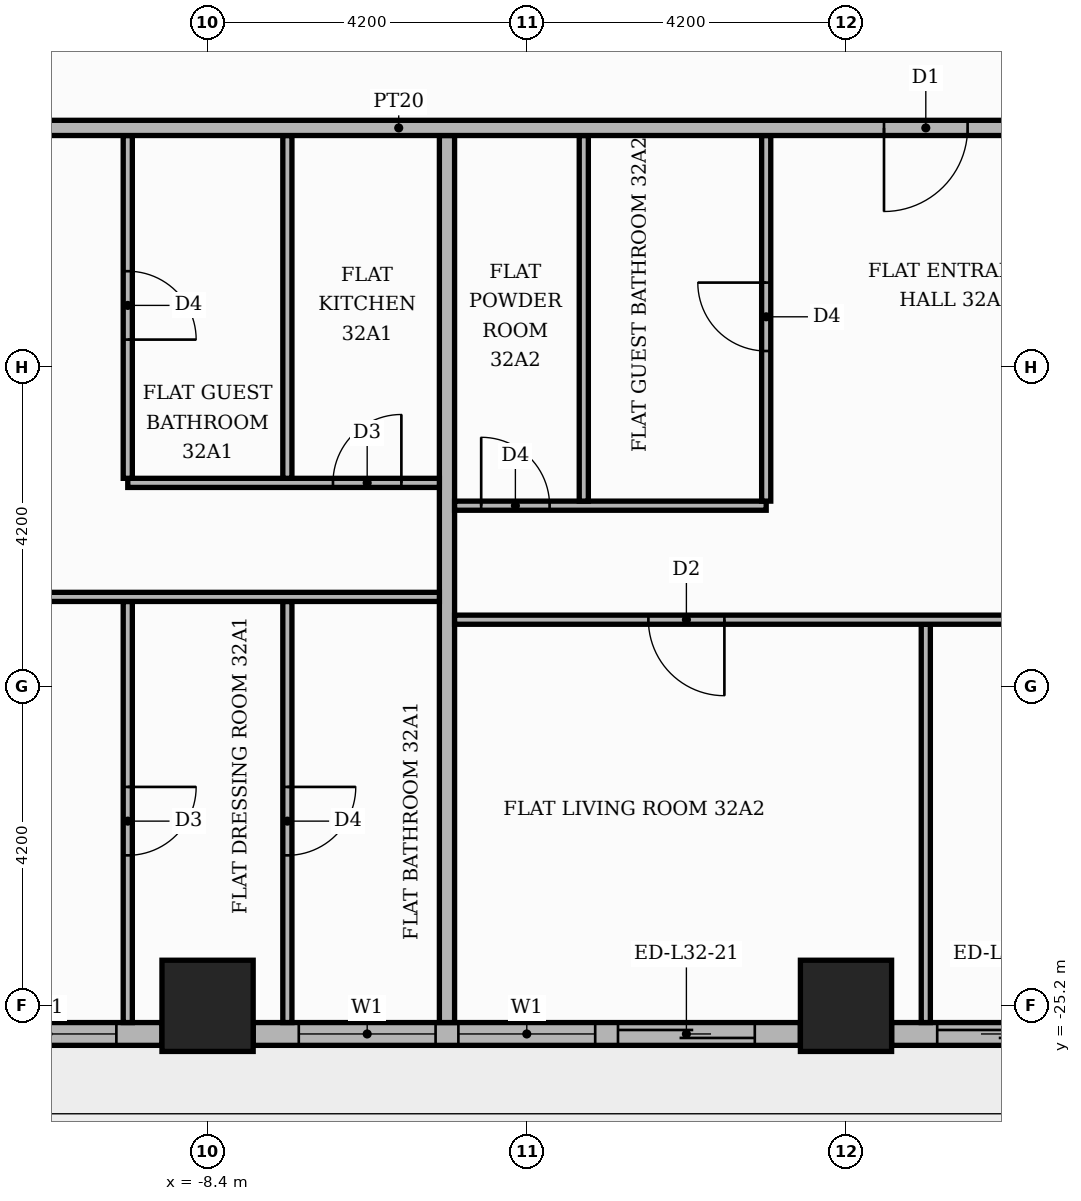
"""IFC4 building model, lengths in metres.
Left out: names, types, materials, properties, quantities, classifications, styles, units other than length and angle.
Written with IfcOpenShell. Run it as: python <this file> out.ifc"""

import sys

from ifc_helpers import new_model, si_unit, direction, frame, frame_2d, origin, origin_2d, place, context, subcontext, project, spatial, rectangle, extrude, element, fill, save


model = new_model("IFC4")
c1 = context("Model", 3, precision=1e-05, world=origin(), true_north=direction((0.0, 1.0)))
c2 = subcontext(c1, "Body", "Model", "MODEL_VIEW")
j1 = project(units=[si_unit("LENGTHUNIT", "METRE"), si_unit("PLANEANGLEUNIT", "RADIAN")], contexts=[c1])
p1 = place(None, origin())
s1 = spatial("IfcSite", under=j1, at=p1, CompositionType="ELEMENT")
p2 = place(p1, origin())
s2 = spatial("IfcBuilding", under=s1, at=p2, CompositionType="ELEMENT")
p3 = place(p2, frame((0.0, 0.0, 137.7)))
s3 = spatial("IfcBuildingStorey", under=s2, at=p3, CompositionType="ELEMENT", Elevation=137.7)
for number, where, z_axis, x_axis in (
    (1, (0.0, -25.2, 0.0), (0.0, 0.0, 1.0), (1.0, 0.0, 0.0)),
    (2, (-8.4, -25.2, 0.0), (0.0, 0.0, 1.0), (1.0, 0.0, 0.0)),
):
    element("IfcColumn", number, at=place(p3, frame(where, z_axis=z_axis, x_axis=x_axis)), inside=s3, PredefinedType="COLUMN", context=c2, shape_type="SweptSolid", body=[
        extrude(rectangle(XDim=1.2, YDim=1.2, at=origin_2d()), origin(), (0.0, 0.0, 1.0), 3.9),
    ])
p4 = place(p3, frame((-16.2, -25.57, 0.0), z_axis=(0.0, 0.0, 1.0), x_axis=(1.0, 0.0, 0.0)))
e3 = element("IfcWall", 3, at=p4, inside=s3, PredefinedType="STANDARD", context=c2, shape_type="SweptSolid", body=[
    extrude(rectangle(XDim=7.2, YDim=0.3, at=frame_2d((3.6, 0.0))), origin(), (0.0, 0.0, 1.0), 3.48),
])
p5 = place(p4, frame((0.6, 0.0, 0.0)))
e4 = element("IfcOpeningElement", 4, at=p5, cuts=e3, PredefinedType="OPENING", context=c2, shape_type="SweptSolid", body=[
    extrude(rectangle(XDim=1.8, YDim=2.4, at=frame_2d((0.9, 1.2))), frame((0.0, 0.16, 0.0), z_axis=(0.0, -1.0, 0.0), x_axis=(1.0, 0.0, 0.0)), (0.0, 0.0, 1.0), 0.32),
])
p6 = place(p4, frame((2.7, 0.0, 0.0)))
e5 = element("IfcOpeningElement", 5, at=p6, cuts=e3, PredefinedType="OPENING", context=c2, shape_type="SweptSolid", body=[
    extrude(rectangle(XDim=1.8, YDim=2.4, at=frame_2d((0.9, 1.2))), frame((0.0, 0.16, 0.0), z_axis=(0.0, -1.0, 0.0), x_axis=(1.0, 0.0, 0.0)), (0.0, 0.0, 1.0), 0.32),
])
p7 = place(p4, frame((4.8, 0.0, 0.9)))
e6 = element("IfcOpeningElement", 6, at=p7, cuts=e3, PredefinedType="OPENING", context=c2, shape_type="SweptSolid", body=[
    extrude(rectangle(XDim=1.8, YDim=2.1, at=frame_2d((0.9, 1.05))), frame((0.0, 0.16, 0.0), z_axis=(0.0, -1.0, 0.0), x_axis=(1.0, 0.0, 0.0)), (0.0, 0.0, 1.0), 0.32),
])
p8 = place(p3, frame((-7.8, -25.57, 0.0), z_axis=(0.0, 0.0, 1.0), x_axis=(1.0, 0.0, 0.0)))
e7 = element("IfcWall", 7, at=p8, inside=s3, PredefinedType="STANDARD", context=c2, shape_type="SweptSolid", body=[
    extrude(rectangle(XDim=7.2, YDim=0.3, at=frame_2d((3.6, 0.0))), origin(), (0.0, 0.0, 1.0), 3.48),
])
p9 = place(p8, frame((0.6, 0.0, 0.9)))
e8 = element("IfcOpeningElement", 8, at=p9, cuts=e7, PredefinedType="OPENING", context=c2, shape_type="SweptSolid", body=[
    extrude(rectangle(XDim=1.8, YDim=2.1, at=frame_2d((0.9, 1.05))), frame((0.0, 0.16, 0.0), z_axis=(0.0, -1.0, 0.0), x_axis=(1.0, 0.0, 0.0)), (0.0, 0.0, 1.0), 0.32),
])
p10 = place(p8, frame((2.7, 0.0, 0.9)))
e9 = element("IfcOpeningElement", 9, at=p10, cuts=e7, PredefinedType="OPENING", context=c2, shape_type="SweptSolid", body=[
    extrude(rectangle(XDim=1.8, YDim=2.1, at=frame_2d((0.9, 1.05))), frame((0.0, 0.16, 0.0), z_axis=(0.0, -1.0, 0.0), x_axis=(1.0, 0.0, 0.0)), (0.0, 0.0, 1.0), 0.32),
])
p11 = place(p8, frame((4.8, 0.0, 0.0)))
e10 = element("IfcOpeningElement", 10, at=p11, cuts=e7, PredefinedType="OPENING", context=c2, shape_type="SweptSolid", body=[
    extrude(rectangle(XDim=1.8, YDim=2.4, at=frame_2d((0.9, 1.2))), frame((0.0, 0.16, 0.0), z_axis=(0.0, -1.0, 0.0), x_axis=(1.0, 0.0, 0.0)), (0.0, 0.0, 1.0), 0.32),
])
p12 = place(p3, frame((0.6, -25.57, 0.0), z_axis=(0.0, 0.0, 1.0), x_axis=(1.0, 0.0, 0.0)))
e11 = element("IfcWall", 11, at=p12, inside=s3, PredefinedType="STANDARD", context=c2, shape_type="SweptSolid", body=[
    extrude(rectangle(XDim=7.2, YDim=0.3, at=frame_2d((3.6, 0.0))), origin(), (0.0, 0.0, 1.0), 3.48),
])
p13 = place(p12, frame((0.6, 0.0, 0.0)))
e12 = element("IfcOpeningElement", 12, at=p13, cuts=e11, PredefinedType="OPENING", context=c2, shape_type="SweptSolid", body=[
    extrude(rectangle(XDim=1.8, YDim=2.4, at=frame_2d((0.9, 1.2))), frame((0.0, 0.16, 0.0), z_axis=(0.0, -1.0, 0.0), x_axis=(1.0, 0.0, 0.0)), (0.0, 0.0, 1.0), 0.32),
])
p14 = place(p12, frame((2.7, 0.0, 0.9)))
e13 = element("IfcOpeningElement", 13, at=p14, cuts=e11, PredefinedType="OPENING", context=c2, shape_type="SweptSolid", body=[
    extrude(rectangle(XDim=1.8, YDim=2.1, at=frame_2d((0.9, 1.05))), frame((0.0, 0.16, 0.0), z_axis=(0.0, -1.0, 0.0), x_axis=(1.0, 0.0, 0.0)), (0.0, 0.0, 1.0), 0.32),
])
p15 = place(p12, frame((4.8, 0.0, 0.9)))
e14 = element("IfcOpeningElement", 14, at=p15, cuts=e11, PredefinedType="OPENING", context=c2, shape_type="SweptSolid", body=[
    extrude(rectangle(XDim=1.8, YDim=2.1, at=frame_2d((0.9, 1.05))), frame((0.0, 0.16, 0.0), z_axis=(0.0, -1.0, 0.0), x_axis=(1.0, 0.0, 0.0)), (0.0, 0.0, 1.0), 0.32),
])
p16 = place(p3, frame((-9.45, -25.42, 0.0), z_axis=(0.0, 0.0, 1.0), x_axis=(0.0, 1.0, 0.0)))
e15 = element("IfcWall", 15, at=p16, inside=s3, PredefinedType="PARTITIONING", context=c2, shape_type="SweptSolid", body=[
    extrude(rectangle(XDim=5.54, YDim=0.12, at=frame_2d((2.77, 0.0))), origin(), (0.0, 0.0, 1.0), 3.48),
])
p17 = place(p16, frame((2.2, 0.0, 0.0)))
e16 = element("IfcOpeningElement", 16, at=p17, cuts=e15, PredefinedType="OPENING", context=c2, shape_type="SweptSolid", body=[
    extrude(rectangle(XDim=0.9, YDim=2.1, at=frame_2d((0.45, 1.05))), frame((0.0, 0.07, 0.0), z_axis=(0.0, -1.0, 0.0), x_axis=(1.0, 0.0, 0.0)), (0.0, 0.0, 1.0), 0.14),
])
p18 = place(p3, frame((-7.35, -25.42, 0.0), z_axis=(0.0, 0.0, 1.0), x_axis=(0.0, 1.0, 0.0)))
e17 = element("IfcWall", 17, at=p18, inside=s3, PredefinedType="PARTITIONING", context=c2, shape_type="SweptSolid", body=[
    extrude(rectangle(XDim=5.54, YDim=0.12, at=frame_2d((2.77, 0.0))), origin(), (0.0, 0.0, 1.0), 3.48),
])
p19 = place(p18, frame((2.2, 0.0, 0.0)))
e18 = element("IfcOpeningElement", 18, at=p19, cuts=e17, PredefinedType="OPENING", context=c2, shape_type="SweptSolid", body=[
    extrude(rectangle(XDim=0.9, YDim=2.1, at=frame_2d((0.45, 1.05))), frame((0.0, 0.07, 0.0), z_axis=(0.0, -1.0, 0.0), x_axis=(1.0, 0.0, 0.0)), (0.0, 0.0, 1.0), 0.14),
])
p20 = place(p3, frame((-5.25, -25.42, 0.0), z_axis=(0.0, 0.0, 1.0), x_axis=(0.0, 1.0, 0.0)))
e19 = element("IfcWall", 19, at=p20, inside=s3, PredefinedType="PARTITIONING", context=c2, shape_type="SweptSolid", body=[
    extrude(rectangle(XDim=11.67, YDim=0.2, at=frame_2d((5.835, 0.0))), origin(), (0.0, 0.0, 1.0), 3.48),
])
p21 = place(p3, frame((1.05, -25.42, 0.0), z_axis=(0.0, 0.0, 1.0), x_axis=(0.0, 1.0, 0.0)))
e20 = element("IfcWall", 20, at=p21, inside=s3, PredefinedType="PARTITIONING", context=c2, shape_type="SweptSolid", body=[
    extrude(rectangle(XDim=5.24, YDim=0.12, at=frame_2d((2.62, 0.0))), origin(), (0.0, 0.0, 1.0), 3.48),
])
p22 = place(p3, frame((-5.15, -20.12, 0.0), z_axis=(0.0, 0.0, 1.0), x_axis=(1.0, 0.0, 0.0)))
e21 = element("IfcWall", 21, at=p22, inside=s3, PredefinedType="PARTITIONING", context=c2, shape_type="SweptSolid", body=[
    extrude(rectangle(XDim=18.7, YDim=0.12, at=frame_2d((9.35, 0.0))), origin(), (0.0, 0.0, 1.0), 3.48),
])
p23 = place(p22, frame((2.55, 0.0, 0.0)))
e22 = element("IfcOpeningElement", 22, at=p23, cuts=e21, PredefinedType="OPENING", context=c2, shape_type="SweptSolid", body=[
    extrude(rectangle(XDim=1.0, YDim=2.1, at=frame_2d((0.5, 1.05))), frame((0.0, 0.07, 0.0), z_axis=(0.0, -1.0, 0.0), x_axis=(1.0, 0.0, 0.0)), (0.0, 0.0, 1.0), 0.14),
])
p24 = place(p22, frame((7.85, 0.0, 0.0)))
e23 = element("IfcOpeningElement", 23, at=p24, cuts=e21, PredefinedType="OPENING", context=c2, shape_type="SweptSolid", body=[
    extrude(rectangle(XDim=0.9, YDim=2.1, at=frame_2d((0.45, 1.05))), frame((0.0, 0.07, 0.0), z_axis=(0.0, -1.0, 0.0), x_axis=(1.0, 0.0, 0.0)), (0.0, 0.0, 1.0), 0.14),
])
p25 = place(p22, frame((16.25, 0.0, 0.0)))
e24 = element("IfcOpeningElement", 24, at=p25, cuts=e21, PredefinedType="OPENING", context=c2, shape_type="SweptSolid", body=[
    extrude(rectangle(XDim=0.9, YDim=2.1, at=frame_2d((0.45, 1.05))), frame((0.0, 0.07, 0.0), z_axis=(0.0, -1.0, 0.0), x_axis=(1.0, 0.0, 0.0)), (0.0, 0.0, 1.0), 0.14),
])
p26 = place(p3, frame((-17.5, -19.82, 0.0), z_axis=(0.0, 0.0, 1.0), x_axis=(1.0, 0.0, 0.0)))
e25 = element("IfcWall", 25, at=p26, inside=s3, PredefinedType="PARTITIONING", context=c2, shape_type="SweptSolid", body=[
    extrude(rectangle(XDim=12.15, YDim=0.12, at=frame_2d((6.075, 0.0))), origin(), (0.0, 0.0, 1.0), 3.48),
])
p27 = place(p26, frame((2.3, 0.0, 0.0)))
e26 = element("IfcOpeningElement", 26, at=p27, cuts=e25, PredefinedType="OPENING", context=c2, shape_type="SweptSolid", body=[
    extrude(rectangle(XDim=1.0, YDim=2.1, at=frame_2d((0.5, 1.05))), frame((0.0, 0.07, 0.0), z_axis=(0.0, -1.0, 0.0), x_axis=(1.0, 0.0, 0.0)), (0.0, 0.0, 1.0), 0.14),
])
p28 = place(p26, frame((5.5, 0.0, 0.0)))
e27 = element("IfcOpeningElement", 27, at=p28, cuts=e25, PredefinedType="OPENING", context=c2, shape_type="SweptSolid", body=[
    extrude(rectangle(XDim=0.9, YDim=2.1, at=frame_2d((0.45, 1.05))), frame((0.0, 0.07, 0.0), z_axis=(0.0, -1.0, 0.0), x_axis=(1.0, 0.0, 0.0)), (0.0, 0.0, 1.0), 0.14),
])
p29 = place(p3, frame((-5.15, -18.62, 0.0), z_axis=(0.0, 0.0, 1.0), x_axis=(1.0, 0.0, 0.0)))
e28 = element("IfcWall", 28, at=p29, inside=s3, PredefinedType="PARTITIONING", context=c2, shape_type="SweptSolid", body=[
    extrude(rectangle(XDim=4.1, YDim=0.12, at=frame_2d((2.05, 0.0))), origin(), (0.0, 0.0, 1.0), 3.48),
])
p30 = place(p29, frame((0.35, 0.0, 0.0)))
e29 = element("IfcOpeningElement", 29, at=p30, cuts=e28, PredefinedType="OPENING", context=c2, shape_type="SweptSolid", body=[
    extrude(rectangle(XDim=0.9, YDim=2.1, at=frame_2d((0.45, 1.05))), frame((0.0, 0.07, 0.0), z_axis=(0.0, -1.0, 0.0), x_axis=(1.0, 0.0, 0.0)), (0.0, 0.0, 1.0), 0.14),
])
p31 = place(p3, frame((-3.45, -18.56, 0.0), z_axis=(0.0, 0.0, 1.0), x_axis=(0.0, 1.0, 0.0)))
e30 = element("IfcWall", 30, at=p31, inside=s3, PredefinedType="PARTITIONING", context=c2, shape_type="SweptSolid", body=[
    extrude(rectangle(XDim=4.81, YDim=0.12, at=frame_2d((2.405, 0.0))), origin(), (0.0, 0.0, 1.0), 3.48),
])
p32 = place(p3, frame((-1.05, -18.56, 0.0), z_axis=(0.0, 0.0, 1.0), x_axis=(0.0, 1.0, 0.0)))
e31 = element("IfcWall", 31, at=p32, inside=s3, PredefinedType="PARTITIONING", context=c2, shape_type="SweptSolid", body=[
    extrude(rectangle(XDim=4.81, YDim=0.12, at=frame_2d((2.405, 0.0))), origin(), (0.0, 0.0, 1.0), 3.48),
])
p33 = place(p32, frame((1.975, 0.0, 0.0)))
e32 = element("IfcOpeningElement", 32, at=p33, cuts=e31, PredefinedType="OPENING", context=c2, shape_type="SweptSolid", body=[
    extrude(rectangle(XDim=0.9, YDim=2.1, at=frame_2d((0.45, 1.05))), frame((0.0, 0.07, 0.0), z_axis=(0.0, -1.0, 0.0), x_axis=(1.0, 0.0, 0.0)), (0.0, 0.0, 1.0), 0.14),
])
p34 = place(p3, frame((-9.45, -18.32, 0.0), z_axis=(0.0, 0.0, 1.0), x_axis=(1.0, 0.0, 0.0)))
e33 = element("IfcWall", 33, at=p34, inside=s3, PredefinedType="PARTITIONING", context=c2, shape_type="SweptSolid", body=[
    extrude(rectangle(XDim=4.1, YDim=0.12, at=frame_2d((2.05, 0.0))), origin(), (0.0, 0.0, 1.0), 3.48),
])
p35 = place(p34, frame((2.7, 0.0, 0.0)))
e34 = element("IfcOpeningElement", 34, at=p35, cuts=e33, PredefinedType="OPENING", context=c2, shape_type="SweptSolid", body=[
    extrude(rectangle(XDim=0.9, YDim=2.1, at=frame_2d((0.45, 1.05))), frame((0.0, 0.07, 0.0), z_axis=(0.0, -1.0, 0.0), x_axis=(1.0, 0.0, 0.0)), (0.0, 0.0, 1.0), 0.14),
])
p36 = place(p3, frame((-9.45, -18.26, 0.0), z_axis=(0.0, 0.0, 1.0), x_axis=(0.0, 1.0, 0.0)))
e35 = element("IfcWall", 35, at=p36, inside=s3, PredefinedType="PARTITIONING", context=c2, shape_type="SweptSolid", body=[
    extrude(rectangle(XDim=4.51, YDim=0.12, at=frame_2d((2.255, 0.0))), origin(), (0.0, 0.0, 1.0), 3.48),
])
p37 = place(p36, frame((1.825, 0.0, 0.0)))
e36 = element("IfcOpeningElement", 36, at=p37, cuts=e35, PredefinedType="OPENING", context=c2, shape_type="SweptSolid", body=[
    extrude(rectangle(XDim=0.9, YDim=2.1, at=frame_2d((0.45, 1.05))), frame((0.0, 0.07, 0.0), z_axis=(0.0, -1.0, 0.0), x_axis=(1.0, 0.0, 0.0)), (0.0, 0.0, 1.0), 0.14),
])
p38 = place(p3, frame((-7.35, -18.26, 0.0), z_axis=(0.0, 0.0, 1.0), x_axis=(0.0, 1.0, 0.0)))
e37 = element("IfcWall", 37, at=p38, inside=s3, PredefinedType="PARTITIONING", context=c2, shape_type="SweptSolid", body=[
    extrude(rectangle(XDim=4.51, YDim=0.12, at=frame_2d((2.255, 0.0))), origin(), (0.0, 0.0, 1.0), 3.48),
])
p39 = place(p3, frame((-25.42, -13.65, 0.0), z_axis=(0.0, 0.0, 1.0), x_axis=(1.0, 0.0, 0.0)))
e38 = element("IfcWall", 38, at=p39, inside=s3, PredefinedType="PARTITIONING", context=c2, shape_type="SweptSolid", body=[
    extrude(rectangle(XDim=39.07, YDim=0.2, at=frame_2d((19.535, 0.0))), origin(), (0.0, 0.0, 1.0), 3.48),
])
p40 = place(p39, frame((13.32, 0.0, 0.0)))
e39 = element("IfcOpeningElement", 39, at=p40, cuts=e38, PredefinedType="OPENING", context=c2, shape_type="SweptSolid", body=[
    extrude(rectangle(XDim=1.1, YDim=2.4, at=frame_2d((0.55, 1.2))), frame((0.0, 0.11, 0.0), z_axis=(0.0, -1.0, 0.0), x_axis=(1.0, 0.0, 0.0)), (0.0, 0.0, 1.0), 0.22),
])
p41 = place(p39, frame((25.92, 0.0, 0.0)))
e40 = element("IfcOpeningElement", 40, at=p41, cuts=e38, PredefinedType="OPENING", context=c2, shape_type="SweptSolid", body=[
    extrude(rectangle(XDim=1.1, YDim=2.4, at=frame_2d((0.55, 1.2))), frame((0.0, 0.11, 0.0), z_axis=(0.0, -1.0, 0.0), x_axis=(1.0, 0.0, 0.0)), (0.0, 0.0, 1.0), 0.22),
])
p42 = place(p7, origin())
e41 = element("IfcWindow", 41, at=p42, inside=s3, PartitioningType="SINGLE_PANEL", PredefinedType="WINDOW", context=c2, shape_type="SweptSolid", body=[
    extrude(rectangle(XDim=1.8, YDim=2.1, at=frame_2d((0.9, 1.05))), frame((0.0, 0.03, 0.0), z_axis=(0.0, -1.0, 0.0), x_axis=(1.0, 0.0, 0.0)), (0.0, 0.0, 1.0), 0.06),
])
fill(e6, e41)
p43 = place(p9, origin())
e42 = element("IfcWindow", 42, at=p43, inside=s3, PartitioningType="SINGLE_PANEL", PredefinedType="WINDOW", context=c2, shape_type="SweptSolid", body=[
    extrude(rectangle(XDim=1.8, YDim=2.1, at=frame_2d((0.9, 1.05))), frame((0.0, 0.03, 0.0), z_axis=(0.0, -1.0, 0.0), x_axis=(1.0, 0.0, 0.0)), (0.0, 0.0, 1.0), 0.06),
])
fill(e8, e42)
p44 = place(p10, origin())
e43 = element("IfcWindow", 43, at=p44, inside=s3, PartitioningType="SINGLE_PANEL", PredefinedType="WINDOW", context=c2, shape_type="SweptSolid", body=[
    extrude(rectangle(XDim=1.8, YDim=2.1, at=frame_2d((0.9, 1.05))), frame((0.0, 0.03, 0.0), z_axis=(0.0, -1.0, 0.0), x_axis=(1.0, 0.0, 0.0)), (0.0, 0.0, 1.0), 0.06),
])
fill(e9, e43)
p45 = place(p11, origin())
e44 = element("IfcDoor", 44, at=p45, inside=s3, OperationType="SLIDING_TO_RIGHT", PredefinedType="DOOR", context=c2, shape_type="SweptSolid", body=[
    extrude(rectangle(XDim=1.8, YDim=2.4, at=frame_2d((0.9, 1.2))), frame((0.0, 0.025, 0.0), z_axis=(0.0, -1.0, 0.0), x_axis=(1.0, 0.0, 0.0)), (0.0, 0.0, 1.0), 0.05),
])
fill(e10, e44)
p46 = place(p13, origin())
e45 = element("IfcDoor", 45, at=p46, inside=s3, OperationType="SLIDING_TO_LEFT", PredefinedType="DOOR", context=c2, shape_type="SweptSolid", body=[
    extrude(rectangle(XDim=1.8, YDim=2.4, at=frame_2d((0.9, 1.2))), frame((0.0, 0.025, 0.0), z_axis=(0.0, -1.0, 0.0), x_axis=(1.0, 0.0, 0.0)), (0.0, 0.0, 1.0), 0.05),
])
fill(e12, e45)
p47 = place(p37, frame((0.9, 0.0, 0.0), z_axis=(0.0, 0.0, 1.0), x_axis=(-1.0, 0.0, 0.0)))
e46 = element("IfcDoor", 46, at=p47, inside=s3, OperationType="SINGLE_SWING_LEFT", PredefinedType="DOOR", context=c2, shape_type="SweptSolid", body=[
    extrude(rectangle(XDim=0.9, YDim=2.1, at=frame_2d((0.45, 1.05))), frame((0.0, 0.025, 0.0), z_axis=(0.0, -1.0, 0.0), x_axis=(1.0, 0.0, 0.0)), (0.0, 0.0, 1.0), 0.05),
])
fill(e36, e46)
p48 = place(p35, origin())
e47 = element("IfcDoor", 47, at=p48, inside=s3, OperationType="SINGLE_SWING_RIGHT", PredefinedType="DOOR", context=c2, shape_type="SweptSolid", body=[
    extrude(rectangle(XDim=0.9, YDim=2.1, at=frame_2d((0.45, 1.05))), frame((0.0, 0.025, 0.0), z_axis=(0.0, -1.0, 0.0), x_axis=(1.0, 0.0, 0.0)), (0.0, 0.0, 1.0), 0.05),
])
fill(e34, e47)
p49 = place(p17, frame((0.9, 0.0, 0.0), z_axis=(0.0, 0.0, 1.0), x_axis=(-1.0, 0.0, 0.0)))
e48 = element("IfcDoor", 48, at=p49, inside=s3, OperationType="SINGLE_SWING_RIGHT", PredefinedType="DOOR", context=c2, shape_type="SweptSolid", body=[
    extrude(rectangle(XDim=0.9, YDim=2.1, at=frame_2d((0.45, 1.05))), frame((0.0, 0.025, 0.0), z_axis=(0.0, -1.0, 0.0), x_axis=(1.0, 0.0, 0.0)), (0.0, 0.0, 1.0), 0.05),
])
fill(e16, e48)
p50 = place(p19, frame((0.9, 0.0, 0.0), z_axis=(0.0, 0.0, 1.0), x_axis=(-1.0, 0.0, 0.0)))
e49 = element("IfcDoor", 49, at=p50, inside=s3, OperationType="SINGLE_SWING_RIGHT", PredefinedType="DOOR", context=c2, shape_type="SweptSolid", body=[
    extrude(rectangle(XDim=0.9, YDim=2.1, at=frame_2d((0.45, 1.05))), frame((0.0, 0.025, 0.0), z_axis=(0.0, -1.0, 0.0), x_axis=(1.0, 0.0, 0.0)), (0.0, 0.0, 1.0), 0.05),
])
fill(e18, e49)
p51 = place(p41, frame((1.1, 0.0, 0.0), z_axis=(0.0, 0.0, 1.0), x_axis=(-1.0, 0.0, 0.0)))
e50 = element("IfcDoor", 50, at=p51, inside=s3, OperationType="SINGLE_SWING_LEFT", PredefinedType="DOOR", context=c2, shape_type="SweptSolid", body=[
    extrude(rectangle(XDim=1.1, YDim=2.4, at=frame_2d((0.55, 1.2))), frame((0.0, 0.025, 0.0), z_axis=(0.0, -1.0, 0.0), x_axis=(1.0, 0.0, 0.0)), (0.0, 0.0, 1.0), 0.05),
])
fill(e40, e50)
p52 = place(p30, origin())
e51 = element("IfcDoor", 51, at=p52, inside=s3, OperationType="SINGLE_SWING_LEFT", PredefinedType="DOOR", context=c2, shape_type="SweptSolid", body=[
    extrude(rectangle(XDim=0.9, YDim=2.1, at=frame_2d((0.45, 1.05))), frame((0.0, 0.025, 0.0), z_axis=(0.0, -1.0, 0.0), x_axis=(1.0, 0.0, 0.0)), (0.0, 0.0, 1.0), 0.05),
])
fill(e29, e51)
p53 = place(p33, origin())
e52 = element("IfcDoor", 52, at=p53, inside=s3, OperationType="SINGLE_SWING_RIGHT", PredefinedType="DOOR", context=c2, shape_type="SweptSolid", body=[
    extrude(rectangle(XDim=0.9, YDim=2.1, at=frame_2d((0.45, 1.05))), frame((0.0, 0.025, 0.0), z_axis=(0.0, -1.0, 0.0), x_axis=(1.0, 0.0, 0.0)), (0.0, 0.0, 1.0), 0.05),
])
fill(e32, e52)
p54 = place(p23, frame((1.0, 0.0, 0.0), z_axis=(0.0, 0.0, 1.0), x_axis=(-1.0, 0.0, 0.0)))
e53 = element("IfcDoor", 53, at=p54, inside=s3, OperationType="SINGLE_SWING_RIGHT", PredefinedType="DOOR", context=c2, shape_type="SweptSolid", body=[
    extrude(rectangle(XDim=1.0, YDim=2.1, at=frame_2d((0.5, 1.05))), frame((0.0, 0.025, 0.0), z_axis=(0.0, -1.0, 0.0), x_axis=(1.0, 0.0, 0.0)), (0.0, 0.0, 1.0), 0.05),
])
fill(e22, e53)
save(model, sys.argv[1])
